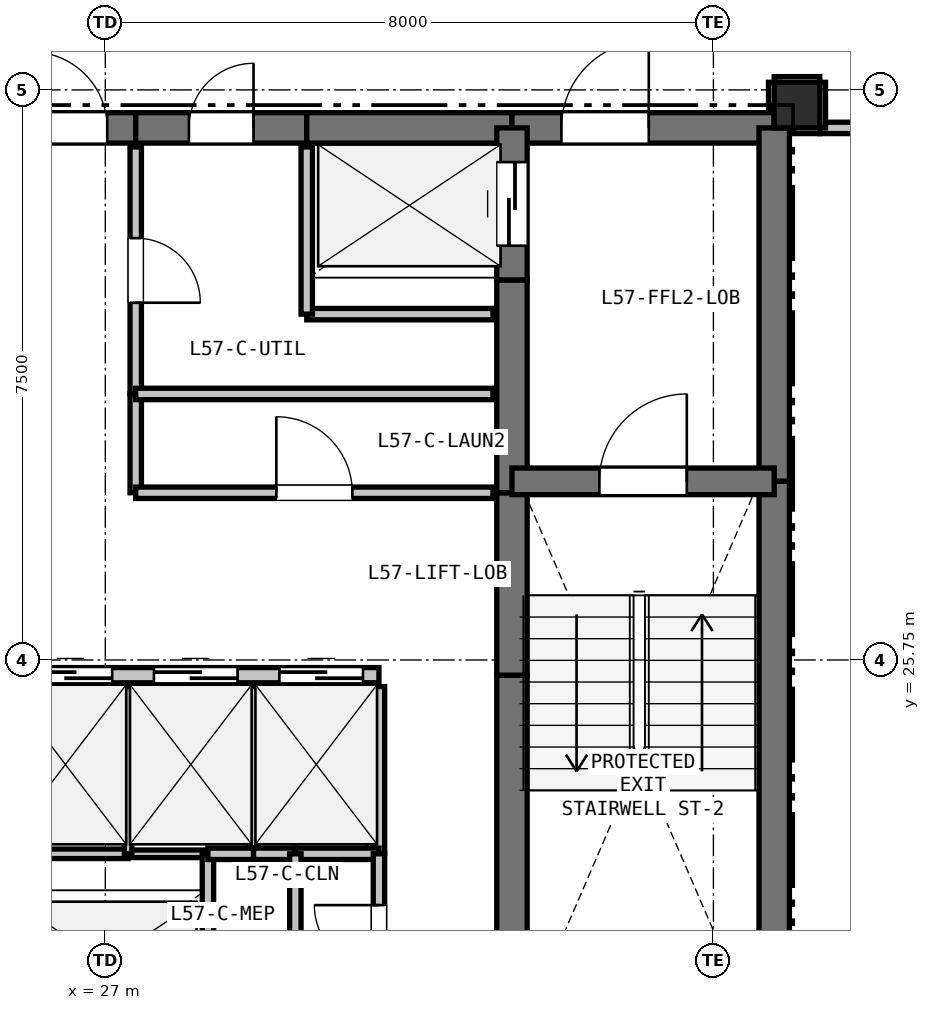
"""IFC4 building model, lengths in metres.
Left out: names, types, materials, properties, quantities, classifications, styles, units other than length and angle.
Written with IfcOpenShell. Run it as: python <this file> out.ifc"""

import sys

from ifc_helpers import new_model, si_unit, direction, frame, frame_2d, origin, origin_2d, place, context, subcontext, project, spatial, rectangle, extrude, element, fill, save


model = new_model("IFC4")
c1 = context("Model", 3, precision=1e-05, world=origin(), true_north=direction((0.0, 1.0)))
c2 = subcontext(c1, "Body", "Model", "MODEL_VIEW")
j1 = project(units=[si_unit("LENGTHUNIT", "METRE"), si_unit("PLANEANGLEUNIT", "RADIAN")], contexts=[c1])
p1 = place(None, origin())
s1 = spatial("IfcSite", under=j1, at=p1, CompositionType="ELEMENT")
p2 = place(p1, origin())
s2 = spatial("IfcBuilding", under=s1, at=p2, CompositionType="ELEMENT")
p3 = place(p2, frame((0.0, 0.0, 205.2)))
s3 = spatial("IfcBuildingStorey", under=s2, at=p3, CompositionType="ELEMENT", Elevation=205.2)
p4 = place(p3, frame((36.1, 33.05, 0.0), z_axis=(0.0, 0.0, 1.0), x_axis=(1.0, 0.0, 0.0)))
e1 = element("IfcColumn", 1, at=p4, inside=s3, PredefinedType="COLUMN", context=c2, shape_type="SweptSolid", body=[
    extrude(rectangle(XDim=0.6, YDim=0.6, at=origin_2d()), origin(), (0.0, 0.0, 1.0), 3.3),
])
p5 = place(p3, frame((25.65, 32.75, 0.0), z_axis=(0.0, 0.0, 1.0), x_axis=(1.0, 0.0, 0.0)))
e2 = element("IfcWall", 2, at=p5, inside=s3, PredefinedType="SHEAR", context=c2, shape_type="SweptSolid", body=[
    extrude(rectangle(XDim=1.75, YDim=0.4, at=frame_2d((0.875, 0.0))), origin(), (0.0, 0.0, 1.0), 3.07),
])
p6 = place(p5, frame((0.375, 0.0, 0.0)))
e3 = element("IfcOpeningElement", 3, at=p6, cuts=e2, PredefinedType="OPENING", context=c2, shape_type="SweptSolid", body=[
    extrude(rectangle(XDim=1.0, YDim=2.15, at=frame_2d((0.5, 1.075))), frame((0.0, 0.21, 0.0), z_axis=(0.0, -1.0, 0.0), x_axis=(1.0, 0.0, 0.0)), (0.0, 0.0, 1.0), 0.42),
])
p7 = place(p3, frame((27.4, 32.75, 0.0), z_axis=(0.0, 0.0, 1.0), x_axis=(1.0, 0.0, 0.0)))
e4 = element("IfcWall", 4, at=p7, inside=s3, PredefinedType="SHEAR", context=c2, shape_type="SweptSolid", body=[
    extrude(rectangle(XDim=2.25, YDim=0.4, at=frame_2d((1.125, 0.0))), origin(), (0.0, 0.0, 1.0), 3.07),
])
p8 = place(p7, frame((0.7, 0.0, 0.0)))
e5 = element("IfcOpeningElement", 5, at=p8, cuts=e4, PredefinedType="OPENING", context=c2, shape_type="SweptSolid", body=[
    extrude(rectangle(XDim=0.85, YDim=2.1, at=frame_2d((0.425, 1.05))), frame((0.0, 0.21, 0.0), z_axis=(0.0, -1.0, 0.0), x_axis=(1.0, 0.0, 0.0)), (0.0, 0.0, 1.0), 0.42),
])
p9 = place(p3, frame((29.65, 32.75, 0.0), z_axis=(0.0, 0.0, 1.0), x_axis=(1.0, 0.0, 0.0)))
e6 = element("IfcWall", 6, at=p9, inside=s3, PredefinedType="SHEAR", context=c2, shape_type="SweptSolid", body=[
    extrude(rectangle(XDim=2.7, YDim=0.4, at=frame_2d((1.35, 0.0))), origin(), (0.0, 0.0, 1.0), 3.07),
])
p10 = place(p3, frame((32.35, 32.75, 0.0), z_axis=(0.0, 0.0, 1.0), x_axis=(1.0, 0.0, 0.0)))
e7 = element("IfcWall", 7, at=p10, inside=s3, PredefinedType="SHEAR", context=c2, shape_type="SweptSolid", body=[
    extrude(rectangle(XDim=3.45, YDim=0.4, at=frame_2d((1.725, 0.0))), origin(), (0.0, 0.0, 1.0), 3.07),
])
p11 = place(p10, frame((0.65, 0.0, 0.0)))
e8 = element("IfcOpeningElement", 8, at=p11, cuts=e7, PredefinedType="OPENING", context=c2, shape_type="SweptSolid", body=[
    extrude(rectangle(XDim=1.15, YDim=2.15, at=frame_2d((0.575, 1.075))), frame((0.0, 0.21, 0.0), z_axis=(0.0, -1.0, 0.0), x_axis=(1.0, 0.0, 0.0)), (0.0, 0.0, 1.0), 0.42),
])
p12 = place(p3, frame((35.8, 32.75, 0.0), z_axis=(0.0, 0.0, 1.0), x_axis=(0.0, -1.0, 0.0)))
e9 = element("IfcWall", 9, at=p12, inside=s3, PredefinedType="SHEAR", context=c2, shape_type="SweptSolid", body=[
    extrude(rectangle(XDim=4.65, YDim=0.4, at=frame_2d((2.325, 0.0))), origin(), (0.0, 0.0, 1.0), 3.07),
])
p13 = place(p3, frame((35.8, 28.1, 0.0), z_axis=(0.0, 0.0, 1.0), x_axis=(0.0, -1.0, 0.0)))
e10 = element("IfcWall", 10, at=p13, inside=s3, PredefinedType="SHEAR", context=c2, shape_type="SweptSolid", body=[
    extrude(rectangle(XDim=7.35, YDim=0.4, at=frame_2d((3.675, 0.0))), origin(), (0.0, 0.0, 1.0), 3.07),
])
p14 = place(p3, frame((32.35, 20.75, 0.0), z_axis=(0.0, 0.0, 1.0), x_axis=(0.0, 1.0, 0.0)))
e11 = element("IfcWall", 11, at=p14, inside=s3, PredefinedType="SHEAR", context=c2, shape_type="SweptSolid", body=[
    extrude(rectangle(XDim=4.8, YDim=0.4, at=frame_2d((2.4, 0.0))), origin(), (0.0, 0.0, 1.0), 3.07),
])
p15 = place(p3, frame((32.35, 25.55, 0.0), z_axis=(0.0, 0.0, 1.0), x_axis=(0.0, 1.0, 0.0)))
e12 = element("IfcWall", 12, at=p15, inside=s3, PredefinedType="SHEAR", context=c2, shape_type="SweptSolid", body=[
    extrude(rectangle(XDim=2.4, YDim=0.4, at=frame_2d((1.2, 0.0))), origin(), (0.0, 0.0, 1.0), 3.07),
])
p16 = place(p3, frame((32.35, 27.95, 0.0), z_axis=(0.0, 0.0, 1.0), x_axis=(0.0, 1.0, 0.0)))
e13 = element("IfcWall", 13, at=p16, inside=s3, PredefinedType="SHEAR", context=c2, shape_type="SweptSolid", body=[
    extrude(rectangle(XDim=2.8, YDim=0.4, at=frame_2d((1.4, 0.0))), origin(), (0.0, 0.0, 1.0), 3.07),
])
p17 = place(p3, frame((32.35, 30.75, 0.0), z_axis=(0.0, 0.0, 1.0), x_axis=(0.0, 1.0, 0.0)))
e14 = element("IfcWall", 14, at=p17, inside=s3, PredefinedType="SHEAR", context=c2, shape_type="SweptSolid", body=[
    extrude(rectangle(XDim=2.0, YDim=0.4, at=frame_2d((1.0, 0.0))), origin(), (0.0, 0.0, 1.0), 3.07),
])
p18 = place(p17, frame((0.45, 0.0, 0.0)))
e15 = element("IfcOpeningElement", 15, at=p18, cuts=e14, PredefinedType="OPENING", context=c2, shape_type="SweptSolid", body=[
    extrude(rectangle(XDim=1.1, YDim=2.15, at=frame_2d((0.55, 1.075))), frame((0.0, 0.21, 0.0), z_axis=(0.0, -1.0, 0.0), x_axis=(1.0, 0.0, 0.0)), (0.0, 0.0, 1.0), 0.42),
])
p19 = place(p3, frame((32.35, 28.1, 0.0), z_axis=(0.0, 0.0, 1.0), x_axis=(1.0, 0.0, 0.0)))
e16 = element("IfcWall", 16, at=p19, inside=s3, PredefinedType="SHEAR", context=c2, shape_type="SweptSolid", body=[
    extrude(rectangle(XDim=3.45, YDim=0.35, at=frame_2d((1.725, 0.0))), origin(), (0.0, 0.0, 1.0), 3.07),
])
p20 = place(p19, frame((1.15, 0.0, 0.0)))
e17 = element("IfcOpeningElement", 17, at=p20, cuts=e16, PredefinedType="OPENING", context=c2, shape_type="SweptSolid", body=[
    extrude(rectangle(XDim=1.15, YDim=2.15, at=frame_2d((0.575, 1.075))), frame((0.0, 0.185, 0.0), z_axis=(0.0, -1.0, 0.0), x_axis=(1.0, 0.0, 0.0)), (0.0, 0.0, 1.0), 0.37),
])
p21 = place(p3, frame((25.65, 25.55, 0.0), z_axis=(0.0, 0.0, 1.0), x_axis=(1.0, 0.0, 0.0)))
e18 = element("IfcWall", 18, at=p21, inside=s3, PredefinedType="PARTITIONING", context=c2, shape_type="SweptSolid", body=[
    extrude(rectangle(XDim=4.95, YDim=0.2, at=frame_2d((2.475, 0.0))), origin(), (0.0, 0.0, 1.0), 3.07),
])
p22 = place(p21, frame((0.34, 0.0, 0.0)))
e19 = element("IfcOpeningElement", 19, at=p22, cuts=e18, PredefinedType="OPENING", context=c2, shape_type="SweptSolid", body=[
    extrude(rectangle(XDim=1.1, YDim=2.15, at=frame_2d((0.55, 1.075))), frame((0.0, 0.11, 0.0), z_axis=(0.0, -1.0, 0.0), x_axis=(1.0, 0.0, 0.0)), (0.0, 0.0, 1.0), 0.22),
])
p23 = place(p21, frame((1.99, 0.0, 0.0)))
e20 = element("IfcOpeningElement", 20, at=p23, cuts=e18, PredefinedType="OPENING", context=c2, shape_type="SweptSolid", body=[
    extrude(rectangle(XDim=1.1, YDim=2.15, at=frame_2d((0.55, 1.075))), frame((0.0, 0.11, 0.0), z_axis=(0.0, -1.0, 0.0), x_axis=(1.0, 0.0, 0.0)), (0.0, 0.0, 1.0), 0.22),
])
p24 = place(p21, frame((3.64, 0.0, 0.0)))
e21 = element("IfcOpeningElement", 21, at=p24, cuts=e18, PredefinedType="OPENING", context=c2, shape_type="SweptSolid", body=[
    extrude(rectangle(XDim=1.1, YDim=2.15, at=frame_2d((0.55, 1.075))), frame((0.0, 0.11, 0.0), z_axis=(0.0, -1.0, 0.0), x_axis=(1.0, 0.0, 0.0)), (0.0, 0.0, 1.0), 0.22),
])
p25 = place(p3, frame((25.9, 23.2, 0.0), z_axis=(0.0, 0.0, 1.0), x_axis=(1.0, 0.0, 0.0)))
e22 = element("IfcWall", 22, at=p25, inside=s3, PredefinedType="PARTITIONING", context=c2, shape_type="SweptSolid", body=[
    extrude(rectangle(XDim=1.4, YDim=0.125, at=frame_2d((0.7, 0.0))), origin(), (0.0, 0.0, 1.0), 3.07),
])
p26 = place(p3, frame((27.3, 23.2, 0.0), z_axis=(0.0, 0.0, 1.0), x_axis=(1.0, 0.0, 0.0)))
e23 = element("IfcWall", 23, at=p26, inside=s3, PredefinedType="PARTITIONING", context=c2, shape_type="SweptSolid", body=[
    extrude(rectangle(XDim=1.05, YDim=0.1, at=frame_2d((0.525, 0.0))), origin(), (0.0, 0.0, 1.0), 3.07),
])
p27 = place(p3, frame((28.35, 23.2, 0.0), z_axis=(0.0, 0.0, 1.0), x_axis=(0.0, -1.0, 0.0)))
e24 = element("IfcWall", 24, at=p27, inside=s3, PredefinedType="PARTITIONING", context=c2, shape_type="SweptSolid", body=[
    extrude(rectangle(XDim=2.2, YDim=0.15, at=frame_2d((1.1, 0.0))), origin(), (0.0, 0.0, 1.0), 3.07),
])
p28 = place(p3, frame((32.1, 30.3, 0.0), z_axis=(0.0, 0.0, 1.0), x_axis=(-1.0, 0.0, 0.0)))
e25 = element("IfcWall", 25, at=p28, inside=s3, PredefinedType="PARTITIONING", context=c2, shape_type="SweptSolid", body=[
    extrude(rectangle(XDim=2.45, YDim=0.15, at=frame_2d((1.225, 0.0))), origin(), (0.0, 0.0, 1.0), 3.07),
])
p29 = place(p3, frame((29.65, 30.3, 0.0), z_axis=(0.0, 0.0, 1.0), x_axis=(0.0, 1.0, 0.0)))
e26 = element("IfcWall", 26, at=p29, inside=s3, PredefinedType="PARTITIONING", context=c2, shape_type="SweptSolid", body=[
    extrude(rectangle(XDim=2.2, YDim=0.15, at=frame_2d((1.1, 0.0))), origin(), (0.0, 0.0, 1.0), 3.07),
])
p30 = place(p3, frame((27.3, 25.4, 0.0), z_axis=(0.0, 0.0, 1.0), x_axis=(0.0, -1.0, 0.0)))
e27 = element("IfcWall", 27, at=p30, inside=s3, PredefinedType="PARTITIONING", context=c2, shape_type="SweptSolid", body=[
    extrude(rectangle(XDim=2.2, YDim=0.1, at=frame_2d((1.1, 0.0))), origin(), (0.0, 0.0, 1.0), 3.07),
])
p31 = place(p3, frame((28.95, 25.4, 0.0), z_axis=(0.0, 0.0, 1.0), x_axis=(0.0, -1.0, 0.0)))
e28 = element("IfcWall", 28, at=p31, inside=s3, PredefinedType="PARTITIONING", context=c2, shape_type="SweptSolid", body=[
    extrude(rectangle(XDim=2.2, YDim=0.125, at=frame_2d((1.1, 0.0))), origin(), (0.0, 0.0, 1.0), 3.07),
])
p32 = place(p3, frame((28.95, 23.2, 0.0), z_axis=(0.0, 0.0, 1.0), x_axis=(-1.0, 0.0, 0.0)))
e29 = element("IfcWall", 29, at=p32, inside=s3, PredefinedType="PARTITIONING", context=c2, shape_type="SweptSolid", body=[
    extrude(rectangle(XDim=0.6, YDim=0.15, at=frame_2d((0.3, 0.0))), origin(), (0.0, 0.0, 1.0), 3.07),
])
p33 = place(p3, frame((30.6, 25.4, 0.0), z_axis=(0.0, 0.0, 1.0), x_axis=(0.0, -1.0, 0.0)))
e30 = element("IfcWall", 30, at=p33, inside=s3, PredefinedType="PARTITIONING", context=c2, shape_type="SweptSolid", body=[
    extrude(rectangle(XDim=2.2, YDim=0.15, at=frame_2d((1.1, 0.0))), origin(), (0.0, 0.0, 1.0), 3.07),
])
p34 = place(p3, frame((30.6, 23.2, 0.0), z_axis=(0.0, 0.0, 1.0), x_axis=(-1.0, 0.0, 0.0)))
e31 = element("IfcWall", 31, at=p34, inside=s3, PredefinedType="PARTITIONING", context=c2, shape_type="SweptSolid", body=[
    extrude(rectangle(XDim=1.1, YDim=0.15, at=frame_2d((0.55, 0.0))), origin(), (0.0, 0.0, 1.0), 3.07),
])
p35 = place(p3, frame((29.5, 23.2, 0.0), z_axis=(0.0, 0.0, 1.0), x_axis=(-1.0, 0.0, 0.0)))
e32 = element("IfcWall", 32, at=p35, inside=s3, PredefinedType="PARTITIONING", context=c2, shape_type="SweptSolid", body=[
    extrude(rectangle(XDim=0.55, YDim=0.15, at=frame_2d((0.275, 0.0))), origin(), (0.0, 0.0, 1.0), 3.07),
])
p36 = place(p3, frame((30.6, 21.0, 0.0), z_axis=(0.0, 0.0, 1.0), x_axis=(0.0, 1.0, 0.0)))
e33 = element("IfcWall", 33, at=p36, inside=s3, PredefinedType="PARTITIONING", context=c2, shape_type="SweptSolid", body=[
    extrude(rectangle(XDim=2.2, YDim=0.15, at=frame_2d((1.1, 0.0))), origin(), (0.0, 0.0, 1.0), 3.07),
])
p37 = place(p36, frame((0.675, 0.0, 0.0)))
e34 = element("IfcOpeningElement", 34, at=p37, cuts=e33, PredefinedType="OPENING", context=c2, shape_type="SweptSolid", body=[
    extrude(rectangle(XDim=0.85, YDim=2.1, at=frame_2d((0.425, 1.05))), frame((0.0, 0.085, 0.0), z_axis=(0.0, -1.0, 0.0), x_axis=(1.0, 0.0, 0.0)), (0.0, 0.0, 1.0), 0.17),
])
p38 = place(p3, frame((27.4, 32.5, 0.0), z_axis=(0.0, 0.0, 1.0), x_axis=(0.0, -1.0, 0.0)))
e35 = element("IfcWall", 35, at=p38, inside=s3, PredefinedType="PARTITIONING", context=c2, shape_type="SweptSolid", body=[
    extrude(rectangle(XDim=3.25, YDim=0.15, at=frame_2d((1.625, 0.0))), origin(), (0.0, 0.0, 1.0), 3.07),
])
p39 = place(p38, frame((1.2, 0.0, 0.0)))
e36 = element("IfcOpeningElement", 36, at=p39, cuts=e35, PredefinedType="OPENING", context=c2, shape_type="SweptSolid", body=[
    extrude(rectangle(XDim=0.85, YDim=2.1, at=frame_2d((0.425, 1.05))), frame((0.0, 0.085, 0.0), z_axis=(0.0, -1.0, 0.0), x_axis=(1.0, 0.0, 0.0)), (0.0, 0.0, 1.0), 0.17),
])
p40 = place(p3, frame((27.4, 29.25, 0.0), z_axis=(0.0, 0.0, 1.0), x_axis=(0.0, -1.0, 0.0)))
e37 = element("IfcWall", 37, at=p40, inside=s3, PredefinedType="PARTITIONING", context=c2, shape_type="SweptSolid", body=[
    extrude(rectangle(XDim=1.3, YDim=0.15, at=frame_2d((0.65, 0.0))), origin(), (0.0, 0.0, 1.0), 3.07),
])
p41 = place(p3, frame((27.4, 27.95, 0.0), z_axis=(0.0, 0.0, 1.0), x_axis=(1.0, 0.0, 0.0)))
e38 = element("IfcWall", 38, at=p41, inside=s3, PredefinedType="PARTITIONING", context=c2, shape_type="SweptSolid", body=[
    extrude(rectangle(XDim=4.7, YDim=0.15, at=frame_2d((2.35, 0.0))), origin(), (0.0, 0.0, 1.0), 3.07),
])
p42 = place(p41, frame((1.85, 0.0, 0.0)))
e39 = element("IfcOpeningElement", 39, at=p42, cuts=e38, PredefinedType="OPENING", context=c2, shape_type="SweptSolid", body=[
    extrude(rectangle(XDim=1.0, YDim=2.15, at=frame_2d((0.5, 1.075))), frame((0.0, 0.085, 0.0), z_axis=(0.0, -1.0, 0.0), x_axis=(1.0, 0.0, 0.0)), (0.0, 0.0, 1.0), 0.17),
])
p43 = place(p3, frame((39.2, 32.75, 0.0), z_axis=(0.0, 0.0, 1.0), x_axis=(-1.0, 0.0, 0.0)))
e40 = element("IfcWall", 40, at=p43, inside=s3, PredefinedType="PARTITIONING", context=c2, shape_type="SweptSolid", body=[
    extrude(rectangle(XDim=2.8, YDim=0.15, at=frame_2d((1.4, 0.0))), origin(), (0.0, 0.0, 1.0), 3.07),
])
p44 = place(p43, frame((0.975, 0.0, 0.0)))
e41 = element("IfcOpeningElement", 41, at=p44, cuts=e40, PredefinedType="OPENING", context=c2, shape_type="SweptSolid", body=[
    extrude(rectangle(XDim=0.85, YDim=2.1, at=frame_2d((0.425, 1.05))), frame((0.0, 0.085, 0.0), z_axis=(0.0, -1.0, 0.0), x_axis=(1.0, 0.0, 0.0)), (0.0, 0.0, 1.0), 0.17),
])
p45 = place(p3, frame((36.4, 32.75, 0.0), z_axis=(0.0, 0.0, 1.0), x_axis=(0.0, 1.0, 0.0)))
e42 = element("IfcWall", 42, at=p45, inside=s3, PredefinedType="PARTITIONING", context=c2, shape_type="SweptSolid", body=[
    extrude(rectangle(XDim=0.6, YDim=0.15, at=frame_2d((0.3, 0.0))), origin(), (0.0, 0.0, 1.0), 2.518),
])
p46 = place(p3, frame((36.4, 33.35, 0.0), z_axis=(0.0, 0.0, 1.0), x_axis=(-1.0, 0.0, 0.0)))
e43 = element("IfcWall", 43, at=p46, inside=s3, PredefinedType="PARTITIONING", context=c2, shape_type="SweptSolid", body=[
    extrude(rectangle(XDim=0.6, YDim=0.15, at=frame_2d((0.3, 0.0))), origin(), (0.0, 0.0, 1.0), 2.518),
])
p47 = place(p3, frame((35.8, 33.35, 0.0), z_axis=(0.0, 0.0, 1.0), x_axis=(0.0, -1.0, 0.0)))
e44 = element("IfcWall", 44, at=p47, inside=s3, PredefinedType="PARTITIONING", context=c2, shape_type="SweptSolid", body=[
    extrude(rectangle(XDim=0.35, YDim=0.15, at=frame_2d((0.175, 0.0))), origin(), (0.0, 0.0, 1.0), 2.595),
])
p48 = place(p3, frame((32.1, 29.25, 0.0), z_axis=(0.0, 0.0, 1.0), x_axis=(-1.0, 0.0, 0.0)))
e45 = element("IfcWall", 45, at=p48, inside=s3, PredefinedType="PARTITIONING", context=c2, shape_type="SweptSolid", body=[
    extrude(rectangle(XDim=4.7, YDim=0.15, at=frame_2d((2.35, 0.0))), origin(), (0.0, 0.0, 1.0), 3.07),
])
p49 = place(p3, frame((29.5, 23.2, 0.0), z_axis=(0.0, 0.0, 1.0), x_axis=(0.0, -1.0, 0.0)))
e46 = element("IfcWall", 46, at=p49, inside=s3, PredefinedType="PARTITIONING", context=c2, shape_type="SweptSolid", body=[
    extrude(rectangle(XDim=2.2, YDim=0.15, at=frame_2d((1.1, 0.0))), origin(), (0.0, 0.0, 1.0), 3.07),
])
p50 = place(p3, frame((36.05, 32.75, 0.0), z_axis=(0.0, 0.0, 1.0), x_axis=(1.0, 0.0, 0.0)))
e47 = element("IfcWall", 47, at=p50, inside=s3, PredefinedType="PARTITIONING", context=c2, shape_type="SweptSolid", body=[
    extrude(rectangle(XDim=0.35, YDim=0.15, at=frame_2d((0.175, 0.0))), origin(), (0.0, 0.0, 1.0), 2.595),
])
p51 = place(p22, origin())
e48 = element("IfcDoor", 48, at=p51, inside=s3, OperationType="SLIDING_TO_LEFT", PredefinedType="DOOR", context=c2, shape_type="SweptSolid", body=[
    extrude(rectangle(XDim=1.1, YDim=2.15, at=frame_2d((0.55, 1.075))), frame((0.0, 0.025, 0.0), z_axis=(0.0, -1.0, 0.0), x_axis=(1.0, 0.0, 0.0)), (0.0, 0.0, 1.0), 0.05),
])
fill(e19, e48)
p52 = place(p23, origin())
e49 = element("IfcDoor", 49, at=p52, inside=s3, OperationType="SLIDING_TO_LEFT", PredefinedType="DOOR", context=c2, shape_type="SweptSolid", body=[
    extrude(rectangle(XDim=1.1, YDim=2.15, at=frame_2d((0.55, 1.075))), frame((0.0, 0.025, 0.0), z_axis=(0.0, -1.0, 0.0), x_axis=(1.0, 0.0, 0.0)), (0.0, 0.0, 1.0), 0.05),
])
fill(e20, e49)
p53 = place(p24, origin())
e50 = element("IfcDoor", 50, at=p53, inside=s3, OperationType="SLIDING_TO_LEFT", PredefinedType="DOOR", context=c2, shape_type="SweptSolid", body=[
    extrude(rectangle(XDim=1.1, YDim=2.15, at=frame_2d((0.55, 1.075))), frame((0.0, 0.025, 0.0), z_axis=(0.0, -1.0, 0.0), x_axis=(1.0, 0.0, 0.0)), (0.0, 0.0, 1.0), 0.05),
])
fill(e21, e50)
p54 = place(p6, origin())
e51 = element("IfcDoor", 51, at=p54, inside=s3, OperationType="SINGLE_SWING_LEFT", PredefinedType="DOOR", context=c2, shape_type="SweptSolid", body=[
    extrude(rectangle(XDim=1.0, YDim=2.15, at=frame_2d((0.5, 1.075))), frame((0.0, 0.025, 0.0), z_axis=(0.0, -1.0, 0.0), x_axis=(1.0, 0.0, 0.0)), (0.0, 0.0, 1.0), 0.05),
])
fill(e3, e51)
p55 = place(p18, origin())
e52 = element("IfcDoor", 52, at=p55, inside=s3, OperationType="SLIDING_TO_LEFT", PredefinedType="DOOR", context=c2, shape_type="SweptSolid", body=[
    extrude(rectangle(XDim=1.1, YDim=2.15, at=frame_2d((0.55, 1.075))), frame((0.0, 0.025, 0.0), z_axis=(0.0, -1.0, 0.0), x_axis=(1.0, 0.0, 0.0)), (0.0, 0.0, 1.0), 0.05),
])
fill(e15, e52)
p56 = place(p20, origin())
e53 = element("IfcDoor", 53, at=p56, inside=s3, OperationType="SINGLE_SWING_RIGHT", PredefinedType="DOOR", context=c2, shape_type="SweptSolid", body=[
    extrude(rectangle(XDim=1.15, YDim=2.15, at=frame_2d((0.575, 1.075))), frame((0.0, 0.025, 0.0), z_axis=(0.0, -1.0, 0.0), x_axis=(1.0, 0.0, 0.0)), (0.0, 0.0, 1.0), 0.05),
])
fill(e17, e53)
p57 = place(p11, origin())
e54 = element("IfcDoor", 54, at=p57, inside=s3, OperationType="SINGLE_SWING_RIGHT", PredefinedType="DOOR", context=c2, shape_type="SweptSolid", body=[
    extrude(rectangle(XDim=1.15, YDim=2.15, at=frame_2d((0.575, 1.075))), frame((0.0, 0.025, 0.0), z_axis=(0.0, -1.0, 0.0), x_axis=(1.0, 0.0, 0.0)), (0.0, 0.0, 1.0), 0.05),
])
fill(e8, e54)
p58 = place(p39, origin())
e55 = element("IfcDoor", 55, at=p58, inside=s3, OperationType="SINGLE_SWING_RIGHT", PredefinedType="DOOR", context=c2, shape_type="SweptSolid", body=[
    extrude(rectangle(XDim=0.85, YDim=2.1, at=frame_2d((0.425, 1.05))), frame((0.0, 0.025, 0.0), z_axis=(0.0, -1.0, 0.0), x_axis=(1.0, 0.0, 0.0)), (0.0, 0.0, 1.0), 0.05),
])
fill(e36, e55)
p59 = place(p42, origin())
e56 = element("IfcDoor", 56, at=p59, inside=s3, OperationType="SINGLE_SWING_LEFT", PredefinedType="DOOR", context=c2, shape_type="SweptSolid", body=[
    extrude(rectangle(XDim=1.0, YDim=2.15, at=frame_2d((0.5, 1.075))), frame((0.0, 0.025, 0.0), z_axis=(0.0, -1.0, 0.0), x_axis=(1.0, 0.0, 0.0)), (0.0, 0.0, 1.0), 0.05),
])
fill(e39, e56)
p60 = place(p37, origin())
e57 = element("IfcDoor", 57, at=p60, inside=s3, OperationType="SINGLE_SWING_RIGHT", PredefinedType="DOOR", context=c2, shape_type="SweptSolid", body=[
    extrude(rectangle(XDim=0.85, YDim=2.1, at=frame_2d((0.425, 1.05))), frame((0.0, 0.025, 0.0), z_axis=(0.0, -1.0, 0.0), x_axis=(1.0, 0.0, 0.0)), (0.0, 0.0, 1.0), 0.05),
])
fill(e34, e57)
p61 = place(p8, origin())
e58 = element("IfcDoor", 58, at=p61, inside=s3, OperationType="SINGLE_SWING_RIGHT", PredefinedType="DOOR", context=c2, shape_type="SweptSolid", body=[
    extrude(rectangle(XDim=0.85, YDim=2.1, at=frame_2d((0.425, 1.05))), frame((0.0, 0.025, 0.0), z_axis=(0.0, -1.0, 0.0), x_axis=(1.0, 0.0, 0.0)), (0.0, 0.0, 1.0), 0.05),
])
fill(e5, e58)
save(model, sys.argv[1])
